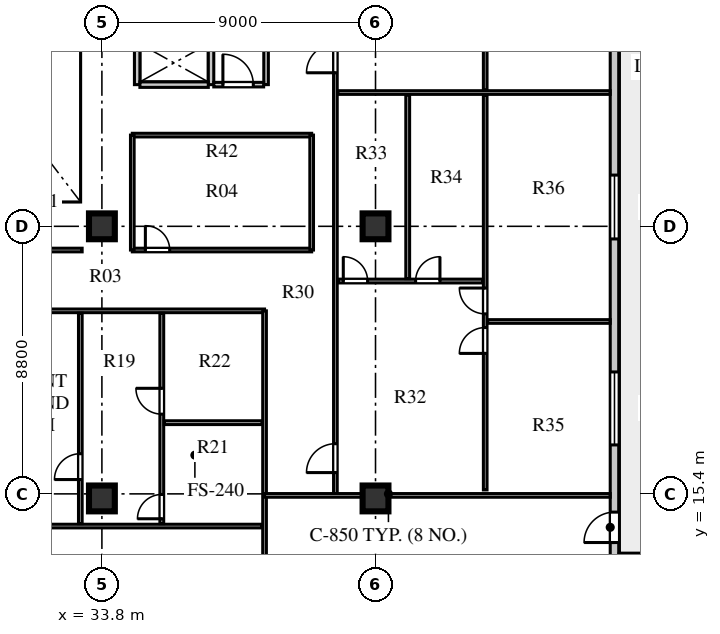
"""IFC4 building model, lengths in metres.
Left out: names, types, materials, properties, quantities, classifications, styles, units other than length and angle.
Written with IfcOpenShell. Run it as: python <this file> out.ifc"""

import sys

from ifc_helpers import new_model, si_unit, direction, frame, frame_2d, origin, origin_2d, place, context, subcontext, project, spatial, rectangle, extrude, element, fill, save


model = new_model("IFC4")
c1 = context("Model", 3, precision=1e-05, world=origin(), true_north=direction((0.0, 1.0)))
c2 = subcontext(c1, "Body", "Model", "MODEL_VIEW")
j1 = project(units=[si_unit("LENGTHUNIT", "METRE"), si_unit("PLANEANGLEUNIT", "RADIAN")], contexts=[c1])
p1 = place(None, origin())
s1 = spatial("IfcSite", under=j1, at=p1, CompositionType="ELEMENT")
p2 = place(p1, origin())
s2 = spatial("IfcBuilding", under=s1, at=p2, CompositionType="ELEMENT")
p3 = place(p2, frame((0.0, 0.0, 221.9)))
s3 = spatial("IfcBuildingStorey", under=s2, at=p3, CompositionType="ELEMENT", Elevation=221.9)
for number, where, z_axis, x_axis in (
    (1, (33.8, 15.25, 0.0), (0.0, 0.0, 1.0), (1.0, 0.0, 0.0)),
    (2, (33.8, 24.2, 0.0), (0.0, 0.0, 1.0), (1.0, 0.0, 0.0)),
    (3, (42.8, 15.25, 0.0), (0.0, 0.0, 1.0), (1.0, 0.0, 0.0)),
    (4, (42.8, 24.2, 0.0), (0.0, 0.0, 1.0), (1.0, 0.0, 0.0)),
):
    element("IfcColumn", number, at=place(p3, frame(where, z_axis=z_axis, x_axis=x_axis)), inside=s3, PredefinedType="COLUMN", context=c2, shape_type="SweptSolid", body=[
        extrude(rectangle(XDim=0.85, YDim=0.85, at=origin_2d()), origin(), (0.0, 0.0, 1.0), 3.66),
    ])
p4 = place(p3, frame((50.66, 13.13, 0.0), z_axis=(0.0, 0.0, 1.0), x_axis=(0.0, 1.0, 0.0)))
e5 = element("IfcWall", 5, at=p4, inside=s3, PredefinedType="STANDARD", context=c2, shape_type="SweptSolid", body=[
    extrude(rectangle(XDim=30.94, YDim=0.28, at=frame_2d((15.47, 0.0))), origin(), (0.0, 0.0, 1.0), 3.66),
])
p5 = place(p4, frame((0.67, 0.0, 0.0)))
e6 = element("IfcOpeningElement", 6, at=p5, cuts=e5, PredefinedType="OPENING", context=c2, shape_type="SweptSolid", body=[
    extrude(rectangle(XDim=1.0, YDim=2.05, at=frame_2d((0.5, 1.025))), frame((0.0, 0.15, 0.0), z_axis=(0.0, -1.0, 0.0), x_axis=(1.0, 0.0, 0.0)), (0.0, 0.0, 1.0), 0.3),
])
p6 = place(p4, frame((3.88, 0.0, 0.8)))
e7 = element("IfcOpeningElement", 7, at=p6, cuts=e5, PredefinedType="OPENING", context=c2, shape_type="SweptSolid", body=[
    extrude(rectangle(XDim=2.4, YDim=2.05, at=frame_2d((1.2, 1.025))), frame((0.0, 0.15, 0.0), z_axis=(0.0, -1.0, 0.0), x_axis=(1.0, 0.0, 0.0)), (0.0, 0.0, 1.0), 0.3),
])
p7 = place(p4, frame((10.655, 0.0, 0.8)))
e8 = element("IfcOpeningElement", 8, at=p7, cuts=e5, PredefinedType="OPENING", context=c2, shape_type="SweptSolid", body=[
    extrude(rectangle(XDim=2.1, YDim=1.95, at=frame_2d((1.05, 0.975))), frame((0.0, 0.15, 0.0), z_axis=(0.0, -1.0, 0.0), x_axis=(1.0, 0.0, 0.0)), (0.0, 0.0, 1.0), 0.3),
])
p8 = place(p4, frame((18.082, 0.0, 0.8)))
e9 = element("IfcOpeningElement", 9, at=p8, cuts=e5, PredefinedType="OPENING", context=c2, shape_type="SweptSolid", body=[
    extrude(rectangle(XDim=1.35, YDim=1.9, at=frame_2d((0.675, 0.95))), frame((0.0, 0.15, 0.0), z_axis=(0.0, -1.0, 0.0), x_axis=(1.0, 0.0, 0.0)), (0.0, 0.0, 1.0), 0.3),
])
p9 = place(p4, frame((24.558, 0.0, 0.8)))
e10 = element("IfcOpeningElement", 10, at=p9, cuts=e5, PredefinedType="OPENING", context=c2, shape_type="SweptSolid", body=[
    extrude(rectangle(XDim=1.65, YDim=1.95, at=frame_2d((0.825, 0.975))), frame((0.0, 0.15, 0.0), z_axis=(0.0, -1.0, 0.0), x_axis=(1.0, 0.0, 0.0)), (0.0, 0.0, 1.0), 0.3),
])
p10 = place(p4, frame((29.175, 0.0, 0.8)))
e11 = element("IfcOpeningElement", 11, at=p10, cuts=e5, PredefinedType="OPENING", context=c2, shape_type="SweptSolid", body=[
    extrude(rectangle(XDim=1.2, YDim=1.75, at=frame_2d((0.6, 0.875))), frame((0.0, 0.15, 0.0), z_axis=(0.0, -1.0, 0.0), x_axis=(1.0, 0.0, 0.0)), (0.0, 0.0, 1.0), 0.3),
])
p11 = place(p3, frame((34.96, 28.86, 0.0), z_axis=(0.0, 0.0, 1.0), x_axis=(0.0, 1.0, 0.0)))
e12 = element("IfcWall", 12, at=p11, inside=s3, PredefinedType="SOLIDWALL", context=c2, shape_type="SweptSolid", body=[
    extrude(rectangle(XDim=4.22, YDim=0.18, at=frame_2d((2.11, 0.0))), origin(), (0.0, 0.0, 1.0), 3.66),
])
p12 = place(p3, frame((37.39, 28.86, 0.0), z_axis=(0.0, 0.0, 1.0), x_axis=(0.0, 1.0, 0.0)))
e13 = element("IfcWall", 13, at=p12, inside=s3, PredefinedType="SOLIDWALL", context=c2, shape_type="SweptSolid", body=[
    extrude(rectangle(XDim=4.22, YDim=0.18, at=frame_2d((2.11, 0.0))), origin(), (0.0, 0.0, 1.0), 3.66),
])
p13 = place(p12, frame((2.1, 0.0, 0.0)))
e14 = element("IfcOpeningElement", 14, at=p13, cuts=e13, PredefinedType="OPENING", context=c2, shape_type="SweptSolid", body=[
    extrude(rectangle(XDim=1.2, YDim=2.12, at=frame_2d((0.6, 1.06))), frame((0.0, 0.1, 0.0), z_axis=(0.0, -1.0, 0.0), x_axis=(1.0, 0.0, 0.0)), (0.0, 0.0, 1.0), 0.2),
])
p14 = place(p3, frame((35.05, 28.86, 0.0), z_axis=(0.0, 0.0, 1.0), x_axis=(1.0, 0.0, 0.0)))
e15 = element("IfcWall", 15, at=p14, inside=s3, PredefinedType="SOLIDWALL", context=c2, shape_type="SweptSolid", body=[
    extrude(rectangle(XDim=2.25, YDim=0.18, at=frame_2d((1.125, 0.0))), origin(), (0.0, 0.0, 1.0), 3.66),
])
p15 = place(p3, frame((39.2, 28.86, 0.0), z_axis=(0.0, 0.0, 1.0), x_axis=(0.0, 1.0, 0.0)))
e16 = element("IfcWall", 16, at=p15, inside=s3, PredefinedType="PARTITIONING", context=c2, shape_type="SweptSolid", body=[
    extrude(rectangle(XDim=4.22, YDim=0.15, at=frame_2d((2.11, 0.0))), origin(), (0.0, 0.0, 1.0), 3.66),
])
p16 = place(p3, frame((37.48, 28.86, 0.0), z_axis=(0.0, 0.0, 1.0), x_axis=(1.0, 0.0, 0.0)))
e17 = element("IfcWall", 17, at=p16, inside=s3, PredefinedType="PARTITIONING", context=c2, shape_type="SweptSolid", body=[
    extrude(rectangle(XDim=1.64, YDim=0.15, at=frame_2d((0.82, 0.0))), origin(), (0.0, 0.0, 1.0), 3.66),
])
p17 = place(p16, frame((0.3, 0.0, 0.0)))
e18 = element("IfcOpeningElement", 18, at=p17, cuts=e17, PredefinedType="OPENING", context=c2, shape_type="SweptSolid", body=[
    extrude(rectangle(XDim=1.0, YDim=2.1, at=frame_2d((0.5, 1.05))), frame((0.0, 0.085, 0.0), z_axis=(0.0, -1.0, 0.0), x_axis=(1.0, 0.0, 0.0)), (0.0, 0.0, 1.0), 0.17),
])
p18 = place(p3, frame((27.08, 21.42, 0.0), z_axis=(0.0, 0.0, 1.0), x_axis=(1.0, 0.0, 0.0)))
e19 = element("IfcWall", 19, at=p18, inside=s3, PredefinedType="PARTITIONING", context=c2, shape_type="SweptSolid", body=[
    extrude(rectangle(XDim=12.07, YDim=0.12, at=frame_2d((6.035, 0.0))), origin(), (0.0, 0.0, 1.0), 3.31),
])
p19 = place(p18, frame((0.63, 0.0, 0.0)))
e20 = element("IfcOpeningElement", 20, at=p19, cuts=e19, PredefinedType="OPENING", context=c2, shape_type="SweptSolid", body=[
    extrude(rectangle(XDim=0.95, YDim=2.1, at=frame_2d((0.475, 1.05))), frame((0.0, 0.07, 0.0), z_axis=(0.0, -1.0, 0.0), x_axis=(1.0, 0.0, 0.0)), (0.0, 0.0, 1.0), 0.14),
])
p20 = place(p3, frame((27.15, 23.42, 0.0), z_axis=(0.0, 0.0, 1.0), x_axis=(1.0, 0.0, 0.0)))
e21 = element("IfcWall", 21, at=p20, inside=s3, PredefinedType="PARTITIONING", context=c2, shape_type="SweptSolid", body=[
    extrude(rectangle(XDim=6.0, YDim=0.12, at=frame_2d((3.0, 0.0))), origin(), (0.0, 0.0, 1.0), 3.66),
])
p21 = place(p3, frame((39.15, 7.88, 0.0), z_axis=(0.0, 0.0, 1.0), x_axis=(0.0, 1.0, 0.0)))
e22 = element("IfcWall", 22, at=p21, inside=s3, PredefinedType="PARTITIONING", context=c2, shape_type="SweptSolid", body=[
    extrude(rectangle(XDim=13.54, YDim=0.12, at=frame_2d((6.77, 0.0))), origin(), (0.0, 0.0, 1.0), 3.66),
])
p22 = place(p3, frame((27.24, 14.341, 0.0), z_axis=(0.0, 0.0, 1.0), x_axis=(1.0, 0.0, 0.0)))
e23 = element("IfcWall", 23, at=p22, inside=s3, PredefinedType="PARTITIONING", context=c2, shape_type="SweptSolid", body=[
    extrude(rectangle(XDim=11.83, YDim=0.12, at=frame_2d((5.915, 0.0))), origin(), (0.0, 0.0, 1.0), 3.66),
])
p23 = place(p22, frame((0.3, 0.0, 0.0)))
e24 = element("IfcOpeningElement", 24, at=p23, cuts=e23, PredefinedType="OPENING", context=c2, shape_type="SweptSolid", body=[
    extrude(rectangle(XDim=0.85, YDim=2.08, at=frame_2d((0.425, 1.04))), frame((0.0, 0.07, 0.0), z_axis=(0.0, -1.0, 0.0), x_axis=(1.0, 0.0, 0.0)), (0.0, 0.0, 1.0), 0.14),
])
p24 = place(p22, frame((3.135, 0.0, 0.0)))
e25 = element("IfcOpeningElement", 25, at=p24, cuts=e23, PredefinedType="OPENING", context=c2, shape_type="SweptSolid", body=[
    extrude(rectangle(XDim=0.85, YDim=2.08, at=frame_2d((0.425, 1.04))), frame((0.0, 0.07, 0.0), z_axis=(0.0, -1.0, 0.0), x_axis=(1.0, 0.0, 0.0)), (0.0, 0.0, 1.0), 0.14),
])
p25 = place(p3, frame((35.77, 14.421, 0.0), z_axis=(0.0, 0.0, 1.0), x_axis=(0.0, 1.0, 0.0)))
e26 = element("IfcWall", 26, at=p25, inside=s3, PredefinedType="PLUMBINGWALL", context=c2, shape_type="SweptSolid", body=[
    extrude(rectangle(XDim=6.919, YDim=0.125, at=frame_2d((3.459, 0.0))), origin(), (0.0, 0.0, 1.0), 3.66),
])
p26 = place(p25, frame((0.16, 0.0, 0.0)))
e27 = element("IfcOpeningElement", 27, at=p26, cuts=e26, PredefinedType="OPENING", context=c2, shape_type="SweptSolid", body=[
    extrude(rectangle(XDim=0.8, YDim=2.05, at=frame_2d((0.4, 1.025))), frame((0.0, 0.073, 0.0), z_axis=(0.0, -1.0, 0.0), x_axis=(1.0, 0.0, 0.0)), (0.0, 0.0, 1.0), 0.145),
])
p27 = place(p25, frame((3.601, 0.0, 0.0)))
e28 = element("IfcOpeningElement", 28, at=p27, cuts=e26, PredefinedType="OPENING", context=c2, shape_type="SweptSolid", body=[
    extrude(rectangle(XDim=0.85, YDim=2.08, at=frame_2d((0.425, 1.04))), frame((0.0, 0.073, 0.0), z_axis=(0.0, -1.0, 0.0), x_axis=(1.0, 0.0, 0.0)), (0.0, 0.0, 1.0), 0.145),
])
p28 = place(p3, frame((35.85, 17.742, 0.0), z_axis=(0.0, 0.0, 1.0), x_axis=(1.0, 0.0, 0.0)))
e29 = element("IfcWall", 29, at=p28, inside=s3, PredefinedType="PLUMBINGWALL", context=c2, shape_type="SweptSolid", body=[
    extrude(rectangle(XDim=3.22, YDim=0.125, at=frame_2d((1.61, 0.0))), origin(), (0.0, 0.0, 1.0), 3.66),
])
p29 = place(p3, frame((33.09, 14.421, 0.0), z_axis=(0.0, 0.0, 1.0), x_axis=(0.0, 1.0, 0.0)))
e30 = element("IfcWall", 30, at=p29, inside=s3, PredefinedType="PARTITIONING", context=c2, shape_type="SweptSolid", body=[
    extrude(rectangle(XDim=6.919, YDim=0.12, at=frame_2d((3.459, 0.0))), origin(), (0.0, 0.0, 1.0), 3.66),
])
p30 = place(p29, frame((1.45, 0.0, 0.0)))
e31 = element("IfcOpeningElement", 31, at=p30, cuts=e30, PredefinedType="OPENING", context=c2, shape_type="SweptSolid", body=[
    extrude(rectangle(XDim=0.85, YDim=2.08, at=frame_2d((0.425, 1.04))), frame((0.0, 0.07, 0.0), z_axis=(0.0, -1.0, 0.0), x_axis=(1.0, 0.0, 0.0)), (0.0, 0.0, 1.0), 0.14),
])
p31 = place(p3, frame((41.48, 15.35, 0.0), z_axis=(0.0, 0.0, 1.0), x_axis=(0.0, 1.0, 0.0)))
e32 = element("IfcWall", 32, at=p31, inside=s3, PredefinedType="PARTITIONING", context=c2, shape_type="SweptSolid", body=[
    extrude(rectangle(XDim=26.5, YDim=0.12, at=frame_2d((13.25, 0.0))), origin(), (0.0, 0.0, 1.0), 3.66),
])
p32 = place(p31, frame((0.75, 0.0, 0.0)))
e33 = element("IfcOpeningElement", 33, at=p32, cuts=e32, PredefinedType="OPENING", context=c2, shape_type="SweptSolid", body=[
    extrude(rectangle(XDim=0.95, YDim=2.1, at=frame_2d((0.475, 1.05))), frame((0.0, 0.07, 0.0), z_axis=(0.0, -1.0, 0.0), x_axis=(1.0, 0.0, 0.0)), (0.0, 0.0, 1.0), 0.14),
])
p33 = place(p31, frame((13.9, 0.0, 0.0)))
e34 = element("IfcOpeningElement", 34, at=p33, cuts=e32, PredefinedType="OPENING", context=c2, shape_type="SweptSolid", body=[
    extrude(rectangle(XDim=0.95, YDim=2.1, at=frame_2d((0.475, 1.05))), frame((0.0, 0.07, 0.0), z_axis=(0.0, -1.0, 0.0), x_axis=(1.0, 0.0, 0.0)), (0.0, 0.0, 1.0), 0.14),
])
p34 = place(p3, frame((39.15, 15.35, 0.0), z_axis=(0.0, 0.0, 1.0), x_axis=(1.0, 0.0, 0.0)))
e35 = element("IfcWall", 35, at=p34, inside=s3, PredefinedType="PARTITIONING", context=c2, shape_type="SweptSolid", body=[
    extrude(rectangle(XDim=11.37, YDim=0.12, at=frame_2d((5.685, 0.0))), origin(), (0.0, 0.0, 1.0), 3.06),
])
p35 = place(p3, frame((46.408, 15.53, 0.0), z_axis=(0.0, 0.0, 1.0), x_axis=(0.0, 1.0, 0.0)))
e36 = element("IfcWall", 36, at=p35, inside=s3, PredefinedType="PARTITIONING", context=c2, shape_type="SweptSolid", body=[
    extrude(rectangle(XDim=12.99, YDim=0.12, at=frame_2d((6.495, 0.0))), origin(), (0.0, 0.0, 1.0), 3.66),
])
p36 = place(p35, frame((4.49, 0.0, 0.0)))
e37 = element("IfcOpeningElement", 37, at=p36, cuts=e36, PredefinedType="OPENING", context=c2, shape_type="SweptSolid", body=[
    extrude(rectangle(XDim=0.85, YDim=2.08, at=frame_2d((0.425, 1.04))), frame((0.0, 0.07, 0.0), z_axis=(0.0, -1.0, 0.0), x_axis=(1.0, 0.0, 0.0)), (0.0, 0.0, 1.0), 0.14),
])
p37 = place(p35, frame((5.79, 0.0, 0.0)))
e38 = element("IfcOpeningElement", 38, at=p37, cuts=e36, PredefinedType="OPENING", context=c2, shape_type="SweptSolid", body=[
    extrude(rectangle(XDim=0.85, YDim=2.08, at=frame_2d((0.425, 1.04))), frame((0.0, 0.07, 0.0), z_axis=(0.0, -1.0, 0.0), x_axis=(1.0, 0.0, 0.0)), (0.0, 0.0, 1.0), 0.14),
])
p38 = place(p3, frame((41.58, 22.4, 0.0), z_axis=(0.0, 0.0, 1.0), x_axis=(1.0, 0.0, 0.0)))
e39 = element("IfcWall", 39, at=p38, inside=s3, PredefinedType="PLUMBINGWALL", context=c2, shape_type="SweptSolid", body=[
    extrude(rectangle(XDim=4.748, YDim=0.125, at=frame_2d((2.374, 0.0))), origin(), (0.0, 0.0, 1.0), 3.66),
])
p39 = place(p38, frame((0.16, 0.0, 0.0)))
e40 = element("IfcOpeningElement", 40, at=p39, cuts=e39, PredefinedType="OPENING", context=c2, shape_type="SweptSolid", body=[
    extrude(rectangle(XDim=0.8, YDim=2.05, at=frame_2d((0.4, 1.025))), frame((0.0, 0.073, 0.0), z_axis=(0.0, -1.0, 0.0), x_axis=(1.0, 0.0, 0.0)), (0.0, 0.0, 1.0), 0.145),
])
p40 = place(p38, frame((2.539, 0.0, 0.0)))
e41 = element("IfcOpeningElement", 41, at=p40, cuts=e39, PredefinedType="OPENING", context=c2, shape_type="SweptSolid", body=[
    extrude(rectangle(XDim=0.8, YDim=2.05, at=frame_2d((0.4, 1.025))), frame((0.0, 0.073, 0.0), z_axis=(0.0, -1.0, 0.0), x_axis=(1.0, 0.0, 0.0)), (0.0, 0.0, 1.0), 0.145),
])
p41 = place(p3, frame((43.859, 22.48, 0.0), z_axis=(0.0, 0.0, 1.0), x_axis=(0.0, 1.0, 0.0)))
e42 = element("IfcWall", 42, at=p41, inside=s3, PredefinedType="PLUMBINGWALL", context=c2, shape_type="SweptSolid", body=[
    extrude(rectangle(XDim=6.04, YDim=0.125, at=frame_2d((3.02, 0.0))), origin(), (0.0, 0.0, 1.0), 3.66),
])
p42 = place(p3, frame((46.488, 21.07, 0.0), z_axis=(0.0, 0.0, 1.0), x_axis=(1.0, 0.0, 0.0)))
e43 = element("IfcWall", 43, at=p42, inside=s3, PredefinedType="PARTITIONING", context=c2, shape_type="SweptSolid", body=[
    extrude(rectangle(XDim=4.032, YDim=0.12, at=frame_2d((2.016, 0.0))), origin(), (0.0, 0.0, 1.0), 3.66),
])
p43 = place(p3, frame((41.56, 28.6, 0.0), z_axis=(0.0, 0.0, 1.0), x_axis=(1.0, 0.0, 0.0)))
e44 = element("IfcWall", 44, at=p43, inside=s3, PredefinedType="PARTITIONING", context=c2, shape_type="SweptSolid", body=[
    extrude(rectangle(XDim=8.96, YDim=0.12, at=frame_2d((4.48, 0.0))), origin(), (0.0, 0.0, 1.0), 3.66),
])
p44 = place(p3, frame((46.408, 28.68, 0.0), z_axis=(0.0, 0.0, 1.0), x_axis=(0.0, 1.0, 0.0)))
e45 = element("IfcWall", 45, at=p44, inside=s3, PredefinedType="PARTITIONING", context=c2, shape_type="SweptSolid", body=[
    extrude(rectangle(XDim=12.99, YDim=0.12, at=frame_2d((6.495, 0.0))), origin(), (0.0, 0.0, 1.0), 3.66),
])
p45 = place(p44, frame((5.445, 0.0, 0.0)))
e46 = element("IfcOpeningElement", 46, at=p45, cuts=e45, PredefinedType="OPENING", context=c2, shape_type="SweptSolid", body=[
    extrude(rectangle(XDim=0.85, YDim=2.08, at=frame_2d((0.425, 1.04))), frame((0.0, 0.07, 0.0), z_axis=(0.0, -1.0, 0.0), x_axis=(1.0, 0.0, 0.0)), (0.0, 0.0, 1.0), 0.14),
])
p46 = place(p44, frame((6.745, 0.0, 0.0)))
e47 = element("IfcOpeningElement", 47, at=p46, cuts=e45, PredefinedType="OPENING", context=c2, shape_type="SweptSolid", body=[
    extrude(rectangle(XDim=0.85, YDim=2.08, at=frame_2d((0.425, 1.04))), frame((0.0, 0.07, 0.0), z_axis=(0.0, -1.0, 0.0), x_axis=(1.0, 0.0, 0.0)), (0.0, 0.0, 1.0), 0.14),
])
p47 = place(p3, frame((34.8, 23.42, 0.0), z_axis=(0.0, 0.0, 1.0), x_axis=(1.0, 0.0, 0.0)))
e48 = element("IfcWall", 48, at=p47, inside=s3, PredefinedType="PARTITIONING", context=c2, shape_type="SweptSolid", body=[
    extrude(rectangle(XDim=5.9, YDim=0.12, at=frame_2d((2.95, 0.0))), origin(), (0.0, 0.0, 1.0), 3.66),
])
p48 = place(p47, frame((0.43, 0.0, 0.0)))
e49 = element("IfcOpeningElement", 49, at=p48, cuts=e48, PredefinedType="OPENING", context=c2, shape_type="SweptSolid", body=[
    extrude(rectangle(XDim=0.8, YDim=2.05, at=frame_2d((0.4, 1.025))), frame((0.0, 0.07, 0.0), z_axis=(0.0, -1.0, 0.0), x_axis=(1.0, 0.0, 0.0)), (0.0, 0.0, 1.0), 0.14),
])
p49 = place(p3, frame((34.8, 27.2, 0.0), z_axis=(0.0, 0.0, 1.0), x_axis=(1.0, 0.0, 0.0)))
e50 = element("IfcWall", 50, at=p49, inside=s3, PredefinedType="PARTITIONING", context=c2, shape_type="SweptSolid", body=[
    extrude(rectangle(XDim=5.9, YDim=0.12, at=frame_2d((2.95, 0.0))), origin(), (0.0, 0.0, 1.0), 3.31),
])
for number, where, z_axis, x_axis in (
    (51, (34.8, 23.42, 0.0), (0.0, 0.0, 1.0), (0.0, 1.0, 0.0)),
    (52, (40.7, 23.42, 0.0), (0.0, 0.0, 1.0), (0.0, 1.0, 0.0)),
):
    element("IfcWall", number, at=place(p3, frame(where, z_axis=z_axis, x_axis=x_axis)), inside=s3, PredefinedType="PARTITIONING", context=c2, shape_type="SweptSolid", body=[
        extrude(rectangle(XDim=3.78, YDim=0.12, at=frame_2d((1.89, 0.0))), origin(), (0.0, 0.0, 1.0), 3.66),
    ])
p50 = place(p5, frame((1.0, 0.0, 0.0), z_axis=(0.0, 0.0, 1.0), x_axis=(-1.0, 0.0, 0.0)))
e53 = element("IfcDoor", 53, at=p50, inside=s3, OperationType="SINGLE_SWING_RIGHT", PredefinedType="DOOR", context=c2, shape_type="SweptSolid", body=[
    extrude(rectangle(XDim=1.0, YDim=2.05, at=frame_2d((0.5, 1.025))), frame((0.0, 0.025, 0.0), z_axis=(0.0, -1.0, 0.0), x_axis=(1.0, 0.0, 0.0)), (0.0, 0.0, 1.0), 0.05),
])
fill(e6, e53)
p51 = place(p6, origin())
e54 = element("IfcWindow", 54, at=p51, inside=s3, PartitioningType="SINGLE_PANEL", PredefinedType="WINDOW", context=c2, shape_type="SweptSolid", body=[
    extrude(rectangle(XDim=2.4, YDim=2.05, at=frame_2d((1.2, 1.025))), frame((0.0, 0.03, 0.0), z_axis=(0.0, -1.0, 0.0), x_axis=(1.0, 0.0, 0.0)), (0.0, 0.0, 1.0), 0.06),
])
fill(e7, e54)
p52 = place(p7, origin())
e55 = element("IfcWindow", 55, at=p52, inside=s3, PartitioningType="SINGLE_PANEL", PredefinedType="WINDOW", context=c2, shape_type="SweptSolid", body=[
    extrude(rectangle(XDim=2.1, YDim=1.95, at=frame_2d((1.05, 0.975))), frame((0.0, 0.03, 0.0), z_axis=(0.0, -1.0, 0.0), x_axis=(1.0, 0.0, 0.0)), (0.0, 0.0, 1.0), 0.06),
])
fill(e8, e55)
p53 = place(p17, origin())
e56 = element("IfcDoor", 56, at=p53, inside=s3, OperationType="SINGLE_SWING_LEFT", PredefinedType="DOOR", context=c2, shape_type="SweptSolid", body=[
    extrude(rectangle(XDim=1.0, YDim=2.1, at=frame_2d((0.5, 1.05))), frame((0.0, 0.025, 0.0), z_axis=(0.0, -1.0, 0.0), x_axis=(1.0, 0.0, 0.0)), (0.0, 0.0, 1.0), 0.05),
])
fill(e18, e56)
p54 = place(p30, origin())
e57 = element("IfcDoor", 57, at=p54, inside=s3, OperationType="SINGLE_SWING_LEFT", PredefinedType="DOOR", context=c2, shape_type="SweptSolid", body=[
    extrude(rectangle(XDim=0.85, YDim=2.08, at=frame_2d((0.425, 1.04))), frame((0.0, 0.025, 0.0), z_axis=(0.0, -1.0, 0.0), x_axis=(1.0, 0.0, 0.0)), (0.0, 0.0, 1.0), 0.05),
])
fill(e31, e57)
p55 = place(p26, origin())
e58 = element("IfcDoor", 58, at=p55, inside=s3, OperationType="SINGLE_SWING_LEFT", PredefinedType="DOOR", context=c2, shape_type="SweptSolid", body=[
    extrude(rectangle(XDim=0.8, YDim=2.05, at=frame_2d((0.4, 1.025))), frame((0.0, 0.025, 0.0), z_axis=(0.0, -1.0, 0.0), x_axis=(1.0, 0.0, 0.0)), (0.0, 0.0, 1.0), 0.05),
])
fill(e27, e58)
p56 = place(p27, origin())
e59 = element("IfcDoor", 59, at=p56, inside=s3, OperationType="SINGLE_SWING_RIGHT", PredefinedType="DOOR", context=c2, shape_type="SweptSolid", body=[
    extrude(rectangle(XDim=0.85, YDim=2.08, at=frame_2d((0.425, 1.04))), frame((0.0, 0.025, 0.0), z_axis=(0.0, -1.0, 0.0), x_axis=(1.0, 0.0, 0.0)), (0.0, 0.0, 1.0), 0.05),
])
fill(e28, e59)
p57 = place(p39, origin())
e60 = element("IfcDoor", 60, at=p57, inside=s3, OperationType="SINGLE_SWING_LEFT", PredefinedType="DOOR", context=c2, shape_type="SweptSolid", body=[
    extrude(rectangle(XDim=0.8, YDim=2.05, at=frame_2d((0.4, 1.025))), frame((0.0, 0.025, 0.0), z_axis=(0.0, -1.0, 0.0), x_axis=(1.0, 0.0, 0.0)), (0.0, 0.0, 1.0), 0.05),
])
fill(e40, e60)
p58 = place(p40, origin())
e61 = element("IfcDoor", 61, at=p58, inside=s3, OperationType="SINGLE_SWING_RIGHT", PredefinedType="DOOR", context=c2, shape_type="SweptSolid", body=[
    extrude(rectangle(XDim=0.8, YDim=2.05, at=frame_2d((0.4, 1.025))), frame((0.0, 0.025, 0.0), z_axis=(0.0, -1.0, 0.0), x_axis=(1.0, 0.0, 0.0)), (0.0, 0.0, 1.0), 0.05),
])
fill(e41, e61)
p59 = place(p36, origin())
e62 = element("IfcDoor", 62, at=p59, inside=s3, OperationType="SINGLE_SWING_LEFT", PredefinedType="DOOR", context=c2, shape_type="SweptSolid", body=[
    extrude(rectangle(XDim=0.85, YDim=2.08, at=frame_2d((0.425, 1.04))), frame((0.0, 0.025, 0.0), z_axis=(0.0, -1.0, 0.0), x_axis=(1.0, 0.0, 0.0)), (0.0, 0.0, 1.0), 0.05),
])
fill(e37, e62)
p60 = place(p37, origin())
e63 = element("IfcDoor", 63, at=p60, inside=s3, OperationType="SINGLE_SWING_RIGHT", PredefinedType="DOOR", context=c2, shape_type="SweptSolid", body=[
    extrude(rectangle(XDim=0.85, YDim=2.08, at=frame_2d((0.425, 1.04))), frame((0.0, 0.025, 0.0), z_axis=(0.0, -1.0, 0.0), x_axis=(1.0, 0.0, 0.0)), (0.0, 0.0, 1.0), 0.05),
])
fill(e38, e63)
p61 = place(p32, origin())
e64 = element("IfcDoor", 64, at=p61, inside=s3, OperationType="SINGLE_SWING_LEFT", PredefinedType="DOOR", context=c2, shape_type="SweptSolid", body=[
    extrude(rectangle(XDim=0.95, YDim=2.1, at=frame_2d((0.475, 1.05))), frame((0.0, 0.025, 0.0), z_axis=(0.0, -1.0, 0.0), x_axis=(1.0, 0.0, 0.0)), (0.0, 0.0, 1.0), 0.05),
])
fill(e33, e64)
p62 = place(p33, origin())
e65 = element("IfcDoor", 65, at=p62, inside=s3, OperationType="SINGLE_SWING_LEFT", PredefinedType="DOOR", context=c2, shape_type="SweptSolid", body=[
    extrude(rectangle(XDim=0.95, YDim=2.1, at=frame_2d((0.475, 1.05))), frame((0.0, 0.025, 0.0), z_axis=(0.0, -1.0, 0.0), x_axis=(1.0, 0.0, 0.0)), (0.0, 0.0, 1.0), 0.05),
])
fill(e34, e65)
p63 = place(p48, origin())
e66 = element("IfcDoor", 66, at=p63, inside=s3, OperationType="SINGLE_SWING_LEFT", PredefinedType="DOOR", context=c2, shape_type="SweptSolid", body=[
    extrude(rectangle(XDim=0.8, YDim=2.05, at=frame_2d((0.4, 1.025))), frame((0.0, 0.025, 0.0), z_axis=(0.0, -1.0, 0.0), x_axis=(1.0, 0.0, 0.0)), (0.0, 0.0, 1.0), 0.05),
])
fill(e49, e66)
save(model, sys.argv[1])
